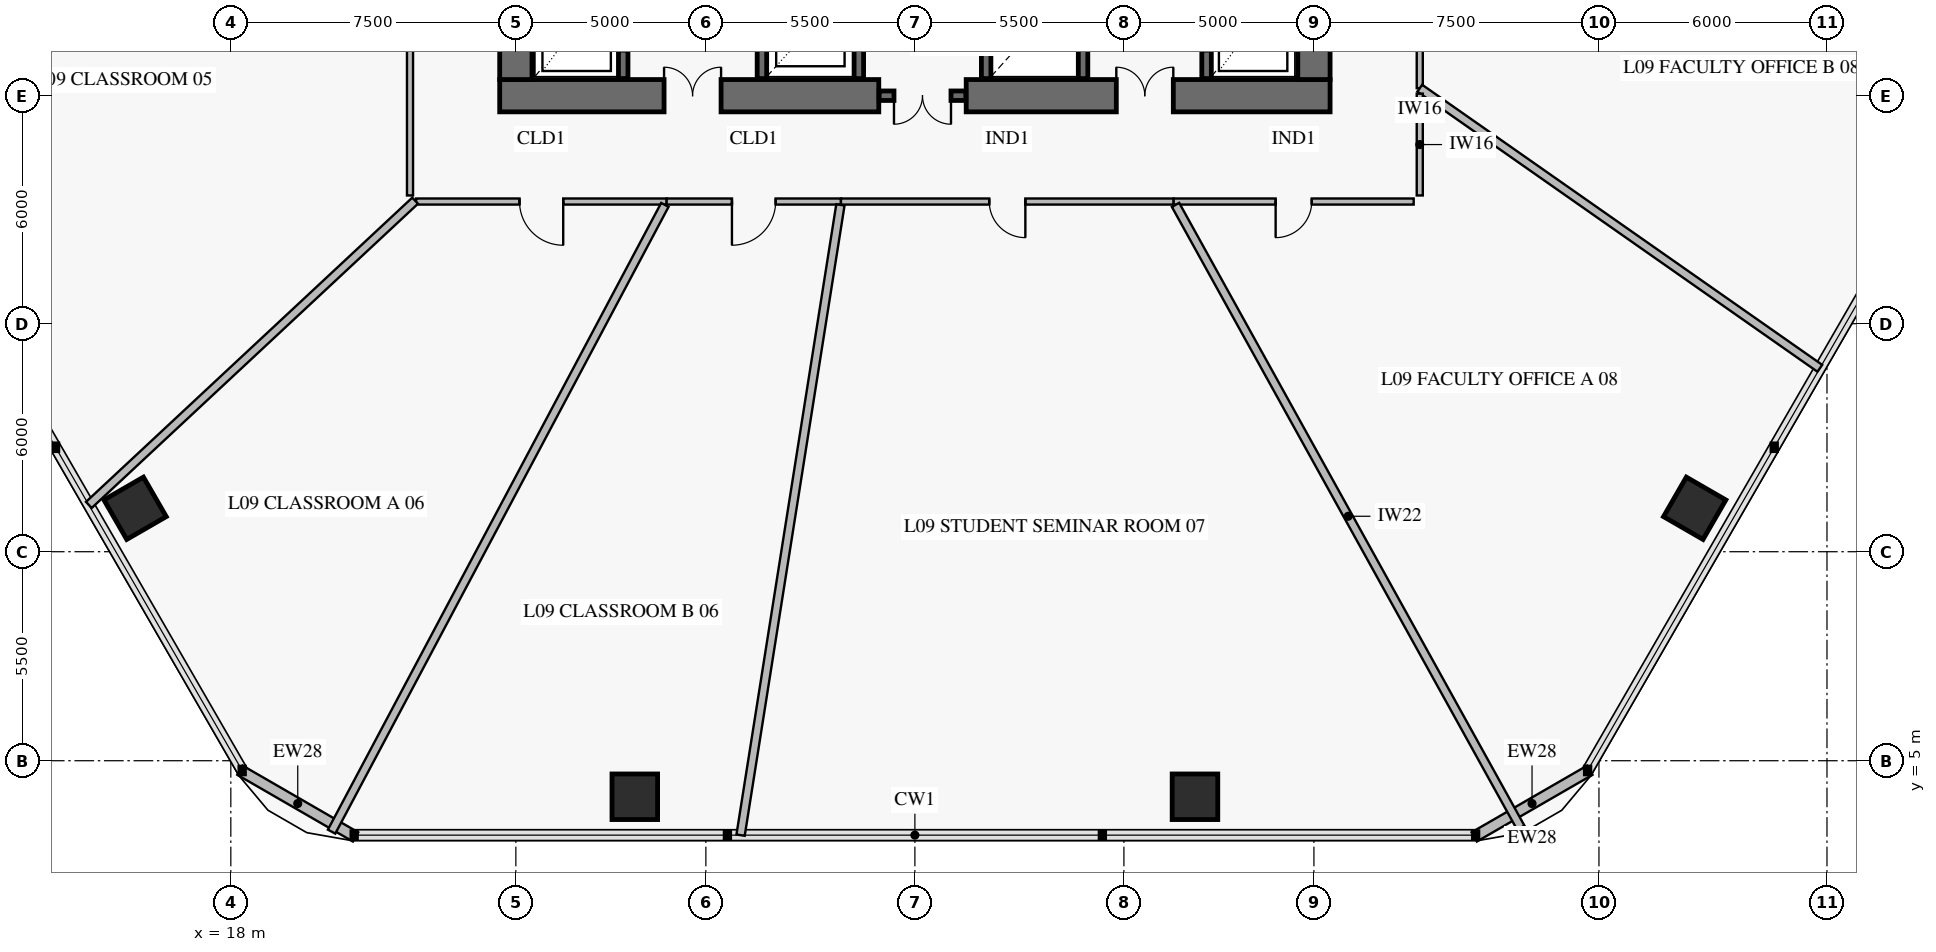
"""IFC4 building model, lengths in metres.
Left out: names, types, materials, properties, quantities, classifications, styles, units other than length and angle.
Written with IfcOpenShell. Run it as: python <this file> out.ifc"""

import sys

from ifc_helpers import new_model, si_unit, direction, frame, frame_2d, origin, origin_2d, place, context, subcontext, project, spatial, rectangle, extrude, element, fill, save


model = new_model("IFC4")
c1 = context("Model", 3, precision=1e-05, world=origin(), true_north=direction((0.0, 1.0)))
c2 = subcontext(c1, "Body", "Model", "MODEL_VIEW")
j1 = project(units=[si_unit("LENGTHUNIT", "METRE"), si_unit("PLANEANGLEUNIT", "RADIAN")], contexts=[c1])
p1 = place(None, origin())
s1 = spatial("IfcSite", under=j1, at=p1, CompositionType="ELEMENT")
p2 = place(p1, origin())
s2 = spatial("IfcBuilding", under=s1, at=p2, CompositionType="ELEMENT")
p3 = place(p2, frame((0.0, 0.0, 37.2)))
s3 = spatial("IfcBuildingStorey", under=s2, at=p3, CompositionType="ELEMENT", Elevation=37.2)
p4 = place(p3, frame((25.075, 22.5, 0.0), z_axis=(0.0, 0.0, 1.0), x_axis=(1.0, 0.0, 0.0)))
e1 = element("IfcWall", 1, at=p4, inside=s3, PredefinedType="SHEAR", context=c2, shape_type="SweptSolid", body=[
    extrude(rectangle(XDim=9.975, YDim=0.85, at=frame_2d((4.988, 0.0))), origin(), (0.0, 0.0, 1.0), 4.2),
])
p5 = place(p4, frame((4.325, 0.0, 0.0)))
e2 = element("IfcOpeningElement", 2, at=p5, cuts=e1, PredefinedType="OPENING", context=c2, shape_type="SweptSolid", body=[
    extrude(rectangle(XDim=1.5, YDim=2.15, at=frame_2d((0.75, 1.075))), frame((0.0, 0.437, 0.0), z_axis=(0.0, -1.0, 0.0), x_axis=(1.0, 0.0, 0.0)), (0.0, 0.0, 1.0), 0.874),
])
p6 = place(p3, frame((37.35, 22.5, 0.0), z_axis=(0.0, 0.0, 1.0), x_axis=(1.0, 0.0, 0.0)))
e3 = element("IfcWall", 3, at=p6, inside=s3, PredefinedType="SHEAR", context=c2, shape_type="SweptSolid", body=[
    extrude(rectangle(XDim=9.575, YDim=0.85, at=frame_2d((4.788, 0.0))), origin(), (0.0, 0.0, 1.0), 4.2),
])
p7 = place(p6, frame((3.95, 0.0, 0.0)))
e4 = element("IfcOpeningElement", 4, at=p7, cuts=e3, PredefinedType="OPENING", context=c2, shape_type="SweptSolid", body=[
    extrude(rectangle(XDim=1.5, YDim=2.15, at=frame_2d((0.75, 1.075))), frame((0.0, 0.437, 0.0), z_axis=(0.0, -1.0, 0.0), x_axis=(1.0, 0.0, 0.0)), (0.0, 0.0, 1.0), 0.874),
])
p8 = place(p3, frame((25.5, 22.925, 0.0), z_axis=(0.0, 0.0, 1.0), x_axis=(0.0, 1.0, 0.0)))
e5 = element("IfcWall", 5, at=p8, inside=s3, PredefinedType="SHEAR", context=c2, shape_type="SweptSolid", body=[
    extrude(rectangle(XDim=18.15, YDim=0.85, at=frame_2d((9.075, 0.0))), origin(), (0.0, 0.0, 1.0), 4.2),
])
p9 = place(p8, frame((8.825, 0.0, 0.0)))
e6 = element("IfcOpeningElement", 6, at=p9, cuts=e5, PredefinedType="OPENING", context=c2, shape_type="SweptSolid", body=[
    extrude(rectangle(XDim=1.1, YDim=2.15, at=frame_2d((0.55, 1.075))), frame((0.0, 0.437, 0.0), z_axis=(0.0, -1.0, 0.0), x_axis=(1.0, 0.0, 0.0)), (0.0, 0.0, 1.0), 0.874),
])
p10 = place(p3, frame((46.5, 22.925, 0.0), z_axis=(0.0, 0.0, 1.0), x_axis=(0.0, 1.0, 0.0)))
e7 = element("IfcWall", 7, at=p10, inside=s3, PredefinedType="SHEAR", context=c2, shape_type="SweptSolid", body=[
    extrude(rectangle(XDim=18.15, YDim=0.85, at=frame_2d((9.075, 0.0))), origin(), (0.0, 0.0, 1.0), 4.2),
])
p11 = place(p10, frame((8.825, 0.0, 0.0)))
e8 = element("IfcOpeningElement", 8, at=p11, cuts=e7, PredefinedType="OPENING", context=c2, shape_type="SweptSolid", body=[
    extrude(rectangle(XDim=1.1, YDim=2.15, at=frame_2d((0.55, 1.075))), frame((0.0, 0.437, 0.0), z_axis=(0.0, -1.0, 0.0), x_axis=(1.0, 0.0, 0.0)), (0.0, 0.0, 1.0), 0.874),
])
for number, where, z_axis, x_axis in (
    (9, (15.481, 11.643, 0.0), (0.0, 0.0, 1.0), (0.5, -0.866, 0.0)),
    (10, (28.63, 4.052, 0.0), (0.0, 0.0, 1.0), (1.0, 0.0, 0.0)),
    (11, (43.37, 4.052, 0.0), (0.0, 0.0, 1.0), (1.0, 0.0, 0.0)),
    (12, (56.519, 11.643, 0.0), (0.0, 0.0, 1.0), (0.5, 0.866, 0.0)),
):
    element("IfcColumn", number, at=place(p3, frame(where, z_axis=z_axis, x_axis=x_axis)), inside=s3, PredefinedType="COLUMN", context=c2, shape_type="SweptSolid", body=[
        extrude(rectangle(XDim=1.2, YDim=1.2, at=origin_2d()), origin(), (0.0, 0.0, 1.0), 3.92),
    ])
for number, where, z_axis, x_axis in (
    (13, (53.761, 4.751, 0.0), (0.0, 0.0, 1.0), (-0.866, -0.5, 0.0)),
    (14, (21.283, 2.994, 0.0), (0.0, 0.0, 1.0), (-0.866, 0.5, 0.0)),
):
    element("IfcWall", number, at=place(p3, frame(where, z_axis=z_axis, x_axis=x_axis)), inside=s3, PredefinedType="SOLIDWALL", context=c2, shape_type="SweptSolid", body=[
        extrude(rectangle(XDim=3.515, YDim=0.28, at=frame_2d((1.757, 0.0))), origin(), (0.0, 0.0, 1.0), 3.92),
    ])
p12 = place(p3, frame((35.06, 22.5, 0.0), z_axis=(0.0, 0.0, 1.0), x_axis=(1.0, 0.0, 0.0)))
e15 = element("IfcWall", 15, at=p12, inside=s3, PredefinedType="SOLIDWALL", context=c2, shape_type="SweptSolid", body=[
    extrude(rectangle(XDim=2.28, YDim=0.25, at=frame_2d((1.14, 0.0))), origin(), (0.0, 0.0, 1.0), 4.2),
])
p13 = place(p12, frame((0.39, 0.0, 0.0)))
e16 = element("IfcOpeningElement", 16, at=p13, cuts=e15, PredefinedType="OPENING", context=c2, shape_type="SweptSolid", body=[
    extrude(rectangle(XDim=1.5, YDim=2.15, at=frame_2d((0.75, 1.075))), frame((0.0, 0.137, 0.0), z_axis=(0.0, -1.0, 0.0), x_axis=(1.0, 0.0, 0.0)), (0.0, 0.0, 1.0), 0.274),
])
p14 = place(p3, frame((28.325, 22.95, 0.0), z_axis=(0.0, 0.0, 1.0), x_axis=(0.0, 1.0, 0.0)))
e17 = element("IfcWall", 17, at=p14, inside=s3, PredefinedType="SOLIDWALL", context=c2, shape_type="SweptSolid", body=[
    extrude(rectangle(XDim=8.2, YDim=0.25, at=frame_2d((4.1, 0.0))), origin(), (0.0, 0.0, 1.0), 4.2),
])
p15 = place(p14, frame((0.75, 0.0, 0.0)))
e18 = element("IfcOpeningElement", 18, at=p15, cuts=e17, PredefinedType="OPENING", context=c2, shape_type="SweptSolid", body=[
    extrude(rectangle(XDim=1.3, YDim=2.3, at=frame_2d((0.65, 1.15))), frame((0.0, 0.137, 0.0), z_axis=(0.0, -1.0, 0.0), x_axis=(1.0, 0.0, 0.0)), (0.0, 0.0, 1.0), 0.274),
])
p16 = place(p14, frame((3.78, 0.0, 0.0)))
e19 = element("IfcOpeningElement", 19, at=p16, cuts=e17, PredefinedType="OPENING", context=c2, shape_type="SweptSolid", body=[
    extrude(rectangle(XDim=0.9, YDim=2.1, at=frame_2d((0.45, 1.05))), frame((0.0, 0.137, 0.0), z_axis=(0.0, -1.0, 0.0), x_axis=(1.0, 0.0, 0.0)), (0.0, 0.0, 1.0), 0.274),
])
p17 = place(p14, frame((6.5, 0.0, 0.0)))
e20 = element("IfcOpeningElement", 20, at=p17, cuts=e17, PredefinedType="OPENING", context=c2, shape_type="SweptSolid", body=[
    extrude(rectangle(XDim=0.9, YDim=2.1, at=frame_2d((0.45, 1.05))), frame((0.0, 0.137, 0.0), z_axis=(0.0, -1.0, 0.0), x_axis=(1.0, 0.0, 0.0)), (0.0, 0.0, 1.0), 0.274),
])
p18 = place(p3, frame((31.975, 22.95, 0.0), z_axis=(0.0, 0.0, 1.0), x_axis=(0.0, 1.0, 0.0)))
e21 = element("IfcWall", 21, at=p18, inside=s3, PredefinedType="SOLIDWALL", context=c2, shape_type="SweptSolid", body=[
    extrude(rectangle(XDim=8.2, YDim=0.25, at=frame_2d((4.1, 0.0))), origin(), (0.0, 0.0, 1.0), 4.2),
])
p19 = place(p3, frame((34.525, 22.95, 0.0), z_axis=(0.0, 0.0, 1.0), x_axis=(0.0, 1.0, 0.0)))
e22 = element("IfcWall", 22, at=p19, inside=s3, PredefinedType="SOLIDWALL", context=c2, shape_type="SweptSolid", body=[
    extrude(rectangle(XDim=8.2, YDim=0.25, at=frame_2d((4.1, 0.0))), origin(), (0.0, 0.0, 1.0), 4.2),
])
p20 = place(p19, frame((0.775, 0.0, 0.0)))
e23 = element("IfcOpeningElement", 23, at=p20, cuts=e22, PredefinedType="OPENING", context=c2, shape_type="SweptSolid", body=[
    extrude(rectangle(XDim=1.1, YDim=2.2, at=frame_2d((0.55, 1.1))), frame((0.0, 0.137, 0.0), z_axis=(0.0, -1.0, 0.0), x_axis=(1.0, 0.0, 0.0)), (0.0, 0.0, 1.0), 0.274),
])
p21 = place(p19, frame((3.575, 0.0, 0.0)))
e24 = element("IfcOpeningElement", 24, at=p21, cuts=e22, PredefinedType="OPENING", context=c2, shape_type="SweptSolid", body=[
    extrude(rectangle(XDim=1.1, YDim=2.2, at=frame_2d((0.55, 1.1))), frame((0.0, 0.137, 0.0), z_axis=(0.0, -1.0, 0.0), x_axis=(1.0, 0.0, 0.0)), (0.0, 0.0, 1.0), 0.274),
])
p22 = place(p19, frame((6.375, 0.0, 0.0)))
e25 = element("IfcOpeningElement", 25, at=p22, cuts=e22, PredefinedType="OPENING", context=c2, shape_type="SweptSolid", body=[
    extrude(rectangle(XDim=1.1, YDim=2.2, at=frame_2d((0.55, 1.1))), frame((0.0, 0.137, 0.0), z_axis=(0.0, -1.0, 0.0), x_axis=(1.0, 0.0, 0.0)), (0.0, 0.0, 1.0), 0.274),
])
for number, where, z_axis, x_axis in (
    (26, (37.875, 22.95, 0.0), (0.0, 0.0, 1.0), (0.0, 1.0, 0.0)),
    (27, (40.425, 22.95, 0.0), (0.0, 0.0, 1.0), (0.0, 1.0, 0.0)),
):
    element("IfcWall", number, at=place(p3, frame(where, z_axis=z_axis, x_axis=x_axis)), inside=s3, PredefinedType="SOLIDWALL", context=c2, shape_type="SweptSolid", body=[
        extrude(rectangle(XDim=8.2, YDim=0.25, at=frame_2d((4.1, 0.0))), origin(), (0.0, 0.0, 1.0), 4.2),
    ])
p23 = place(p3, frame((43.675, 22.95, 0.0), z_axis=(0.0, 0.0, 1.0), x_axis=(0.0, 1.0, 0.0)))
e28 = element("IfcWall", 28, at=p23, inside=s3, PredefinedType="SOLIDWALL", context=c2, shape_type="SweptSolid", body=[
    extrude(rectangle(XDim=8.2, YDim=0.25, at=frame_2d((4.1, 0.0))), origin(), (0.0, 0.0, 1.0), 4.2),
])
p24 = place(p23, frame((0.75, 0.0, 0.0)))
e29 = element("IfcOpeningElement", 29, at=p24, cuts=e28, PredefinedType="OPENING", context=c2, shape_type="SweptSolid", body=[
    extrude(rectangle(XDim=1.3, YDim=2.3, at=frame_2d((0.65, 1.15))), frame((0.0, 0.137, 0.0), z_axis=(0.0, -1.0, 0.0), x_axis=(1.0, 0.0, 0.0)), (0.0, 0.0, 1.0), 0.274),
])
p25 = place(p23, frame((3.7, 0.0, 0.0)))
e30 = element("IfcOpeningElement", 30, at=p25, cuts=e28, PredefinedType="OPENING", context=c2, shape_type="SweptSolid", body=[
    extrude(rectangle(XDim=1.3, YDim=2.3, at=frame_2d((0.65, 1.15))), frame((0.0, 0.137, 0.0), z_axis=(0.0, -1.0, 0.0), x_axis=(1.0, 0.0, 0.0)), (0.0, 0.0, 1.0), 0.274),
])
p26 = place(p23, frame((6.62, 0.0, 0.0)))
e31 = element("IfcOpeningElement", 31, at=p26, cuts=e28, PredefinedType="OPENING", context=c2, shape_type="SweptSolid", body=[
    extrude(rectangle(XDim=0.9, YDim=2.1, at=frame_2d((0.45, 1.05))), frame((0.0, 0.137, 0.0), z_axis=(0.0, -1.0, 0.0), x_axis=(1.0, 0.0, 0.0)), (0.0, 0.0, 1.0), 0.274),
])
p27 = place(p3, frame((22.715, 31.304, 0.0), z_axis=(0.0, 0.0, 1.0), x_axis=(0.0, -1.0, 0.0)))
e32 = element("IfcWall", 32, at=p27, inside=s3, PredefinedType="PARTITIONING", context=c2, shape_type="SweptSolid", body=[
    extrude(rectangle(XDim=11.429, YDim=0.16, at=frame_2d((5.714, 0.0))), origin(), (0.0, 0.0, 1.0), 3.22),
])
p28 = place(p27, frame((5.139, 0.0, 0.0)))
e33 = element("IfcOpeningElement", 33, at=p28, cuts=e32, PredefinedType="OPENING", context=c2, shape_type="SweptSolid", body=[
    extrude(rectangle(XDim=1.15, YDim=2.2, at=frame_2d((0.575, 1.1))), frame((0.0, 0.092, 0.0), z_axis=(0.0, -1.0, 0.0), x_axis=(1.0, 0.0, 0.0)), (0.0, 0.0, 1.0), 0.184),
])
p29 = place(p3, frame((22.875, 19.715, 0.0), z_axis=(0.0, 0.0, 1.0), x_axis=(1.0, 0.0, 0.0)))
e34 = element("IfcWall", 34, at=p29, inside=s3, PredefinedType="PARTITIONING", context=c2, shape_type="SweptSolid", body=[
    extrude(rectangle(XDim=6.593, YDim=0.16, at=frame_2d((3.296, 0.0))), origin(), (0.0, 0.0, 1.0), 3.22),
])
p30 = place(p29, frame((2.721, 0.0, 0.0)))
e35 = element("IfcOpeningElement", 35, at=p30, cuts=e34, PredefinedType="OPENING", context=c2, shape_type="SweptSolid", body=[
    extrude(rectangle(XDim=1.15, YDim=2.2, at=frame_2d((0.575, 1.1))), frame((0.0, 0.092, 0.0), z_axis=(0.0, -1.0, 0.0), x_axis=(1.0, 0.0, 0.0)), (0.0, 0.0, 1.0), 0.184),
])
p31 = place(p3, frame((29.468, 19.715, 0.0), z_axis=(0.0, 0.0, 1.0), x_axis=(1.0, 0.0, 0.0)))
e36 = element("IfcWall", 36, at=p31, inside=s3, PredefinedType="PARTITIONING", context=c2, shape_type="SweptSolid", body=[
    extrude(rectangle(XDim=4.586, YDim=0.16, at=frame_2d((2.293, 0.0))), origin(), (0.0, 0.0, 1.0), 3.22),
])
p32 = place(p31, frame((1.718, 0.0, 0.0)))
e37 = element("IfcOpeningElement", 37, at=p32, cuts=e36, PredefinedType="OPENING", context=c2, shape_type="SweptSolid", body=[
    extrude(rectangle(XDim=1.15, YDim=2.2, at=frame_2d((0.575, 1.1))), frame((0.0, 0.092, 0.0), z_axis=(0.0, -1.0, 0.0), x_axis=(1.0, 0.0, 0.0)), (0.0, 0.0, 1.0), 0.184),
])
p33 = place(p3, frame((34.054, 19.715, 0.0), z_axis=(0.0, 0.0, 1.0), x_axis=(1.0, 0.0, 0.0)))
e38 = element("IfcWall", 38, at=p33, inside=s3, PredefinedType="PARTITIONING", context=c2, shape_type="SweptSolid", body=[
    extrude(rectangle(XDim=8.756, YDim=0.16, at=frame_2d((4.378, 0.0))), origin(), (0.0, 0.0, 1.0), 3.22),
])
p34 = place(p33, frame((3.903, 0.0, 0.0)))
e39 = element("IfcOpeningElement", 39, at=p34, cuts=e38, PredefinedType="OPENING", context=c2, shape_type="SweptSolid", body=[
    extrude(rectangle(XDim=0.95, YDim=2.1, at=frame_2d((0.475, 1.05))), frame((0.0, 0.092, 0.0), z_axis=(0.0, -1.0, 0.0), x_axis=(1.0, 0.0, 0.0)), (0.0, 0.0, 1.0), 0.184),
])
p35 = place(p3, frame((42.81, 19.715, 0.0), z_axis=(0.0, 0.0, 1.0), x_axis=(1.0, 0.0, 0.0)))
e40 = element("IfcWall", 40, at=p35, inside=s3, PredefinedType="PARTITIONING", context=c2, shape_type="SweptSolid", body=[
    extrude(rectangle(XDim=6.315, YDim=0.16, at=frame_2d((3.158, 0.0))), origin(), (0.0, 0.0, 1.0), 3.22),
])
p36 = place(p35, frame((2.683, 0.0, 0.0)))
e41 = element("IfcOpeningElement", 41, at=p36, cuts=e40, PredefinedType="OPENING", context=c2, shape_type="SweptSolid", body=[
    extrude(rectangle(XDim=0.95, YDim=2.1, at=frame_2d((0.475, 1.05))), frame((0.0, 0.092, 0.0), z_axis=(0.0, -1.0, 0.0), x_axis=(1.0, 0.0, 0.0)), (0.0, 0.0, 1.0), 0.184),
])
p37 = place(p3, frame((49.285, 22.698, 0.0), z_axis=(0.0, 0.0, 1.0), x_axis=(0.0, 1.0, 0.0)))
e42 = element("IfcWall", 42, at=p37, inside=s3, PredefinedType="PARTITIONING", context=c2, shape_type="SweptSolid", body=[
    extrude(rectangle(XDim=7.198, YDim=0.16, at=frame_2d((3.599, 0.0))), origin(), (0.0, 0.0, 1.0), 3.22),
])
p38 = place(p37, frame((3.124, 0.0, 0.0)))
e43 = element("IfcOpeningElement", 43, at=p38, cuts=e42, PredefinedType="OPENING", context=c2, shape_type="SweptSolid", body=[
    extrude(rectangle(XDim=0.95, YDim=2.1, at=frame_2d((0.475, 1.05))), frame((0.0, 0.092, 0.0), z_axis=(0.0, -1.0, 0.0), x_axis=(1.0, 0.0, 0.0)), (0.0, 0.0, 1.0), 0.184),
])
p39 = place(p3, frame((22.85, 19.737, 0.0), z_axis=(0.0, 0.0, 1.0), x_axis=(-0.731360864489, -0.681990678744, 0.0)))
e44 = element("IfcWall", 44, at=p39, inside=s3, PredefinedType="PARTITIONING", context=c2, shape_type="SweptSolid", body=[
    extrude(rectangle(XDim=11.74, YDim=0.22, at=frame_2d((5.87, 0.0))), origin(), (0.0, 0.0, 1.0), 3.17),
])
p40 = place(p3, frame((29.421, 19.627, 0.0), z_axis=(0.0, 0.0, 1.0), x_axis=(-0.469469908408, -0.882948472505, 0.0)))
e45 = element("IfcWall", 45, at=p40, inside=s3, PredefinedType="PARTITIONING", context=c2, shape_type="SweptSolid", body=[
    extrude(rectangle(XDim=18.68, YDim=0.22, at=frame_2d((9.34, 0.0))), origin(), (0.0, 0.0, 1.0), 3.17),
])
p41 = place(p3, frame((34.04, 19.627, 0.0), z_axis=(0.0, 0.0, 1.0), x_axis=(-0.156438882107, -0.98768764099, 0.0)))
e46 = element("IfcWall", 46, at=p41, inside=s3, PredefinedType="PARTITIONING", context=c2, shape_type="SweptSolid", body=[
    extrude(rectangle(XDim=16.792, YDim=0.22, at=frame_2d((8.396, 0.0))), origin(), (0.0, 0.0, 1.0), 3.17),
])
p42 = place(p3, frame((42.858, 19.627, 0.0), z_axis=(0.0, 0.0, 1.0), x_axis=(0.484814111505, -0.874617217579, 0.0)))
e47 = element("IfcWall", 47, at=p42, inside=s3, PredefinedType="PARTITIONING", context=c2, shape_type="SweptSolid", body=[
    extrude(rectangle(XDim=18.738, YDim=0.22, at=frame_2d((9.369, 0.0))), origin(), (0.0, 0.0, 1.0), 3.17),
])
p43 = place(p3, frame((49.285, 22.698, 0.0), z_axis=(0.0, 0.0, 1.0), x_axis=(0.819154265409, -0.57357326425, 0.0)))
e48 = element("IfcWall", 48, at=p43, inside=s3, PredefinedType="PARTITIONING", context=c2, shape_type="SweptSolid", body=[
    extrude(rectangle(XDim=12.851, YDim=0.22, at=frame_2d((6.426, 0.0))), origin(), (0.0, 0.0, 1.0), 3.17),
])
p44 = place(p3, frame((49.285, 19.875, 0.0), z_axis=(0.0, 0.0, 1.0), x_axis=(0.0, 1.0, 0.0)))
e49 = element("IfcWall", 49, at=p44, inside=s3, PredefinedType="PARTITIONING", context=c2, shape_type="SweptSolid", body=[
    extrude(rectangle(XDim=2.679, YDim=0.16, at=frame_2d((1.339, 0.0))), origin(), (0.0, 0.0, 1.0), 3.92),
])
p45 = place(p5, origin())
e50 = element("IfcDoor", 50, at=p45, inside=s3, OperationType="DOUBLE_DOOR_SINGLE_SWING", PredefinedType="DOOR", context=c2, shape_type="SweptSolid", body=[
    extrude(rectangle(XDim=1.5, YDim=2.15, at=frame_2d((0.75, 1.075))), frame((0.0, 0.025, 0.0), z_axis=(0.0, -1.0, 0.0), x_axis=(1.0, 0.0, 0.0)), (0.0, 0.0, 1.0), 0.05),
])
fill(e2, e50)
p46 = place(p7, origin())
e51 = element("IfcDoor", 51, at=p46, inside=s3, OperationType="DOUBLE_DOOR_SINGLE_SWING", PredefinedType="DOOR", context=c2, shape_type="SweptSolid", body=[
    extrude(rectangle(XDim=1.5, YDim=2.15, at=frame_2d((0.75, 1.075))), frame((0.0, 0.025, 0.0), z_axis=(0.0, -1.0, 0.0), x_axis=(1.0, 0.0, 0.0)), (0.0, 0.0, 1.0), 0.05),
])
fill(e4, e51)
p47 = place(p13, frame((1.5, 0.0, 0.0), z_axis=(0.0, 0.0, 1.0), x_axis=(-1.0, 0.0, 0.0)))
e52 = element("IfcDoor", 52, at=p47, inside=s3, OperationType="DOUBLE_DOOR_SINGLE_SWING", PredefinedType="DOOR", context=c2, shape_type="SweptSolid", body=[
    extrude(rectangle(XDim=1.5, YDim=2.15, at=frame_2d((0.75, 1.075))), frame((0.0, 0.025, 0.0), z_axis=(0.0, -1.0, 0.0), x_axis=(1.0, 0.0, 0.0)), (0.0, 0.0, 1.0), 0.05),
])
fill(e16, e52)
p48 = place(p30, frame((1.15, 0.0, 0.0), z_axis=(0.0, 0.0, 1.0), x_axis=(-1.0, 0.0, 0.0)))
e53 = element("IfcDoor", 53, at=p48, inside=s3, OperationType="SINGLE_SWING_LEFT", PredefinedType="DOOR", context=c2, shape_type="SweptSolid", body=[
    extrude(rectangle(XDim=1.15, YDim=2.2, at=frame_2d((0.575, 1.1))), frame((0.0, 0.025, 0.0), z_axis=(0.0, -1.0, 0.0), x_axis=(1.0, 0.0, 0.0)), (0.0, 0.0, 1.0), 0.05),
])
fill(e35, e53)
p49 = place(p32, frame((1.15, 0.0, 0.0), z_axis=(0.0, 0.0, 1.0), x_axis=(-1.0, 0.0, 0.0)))
e54 = element("IfcDoor", 54, at=p49, inside=s3, OperationType="SINGLE_SWING_RIGHT", PredefinedType="DOOR", context=c2, shape_type="SweptSolid", body=[
    extrude(rectangle(XDim=1.15, YDim=2.2, at=frame_2d((0.575, 1.1))), frame((0.0, 0.025, 0.0), z_axis=(0.0, -1.0, 0.0), x_axis=(1.0, 0.0, 0.0)), (0.0, 0.0, 1.0), 0.05),
])
fill(e37, e54)
p50 = place(p34, frame((0.95, 0.0, 0.0), z_axis=(0.0, 0.0, 1.0), x_axis=(-1.0, 0.0, 0.0)))
e55 = element("IfcDoor", 55, at=p50, inside=s3, OperationType="SINGLE_SWING_LEFT", PredefinedType="DOOR", context=c2, shape_type="SweptSolid", body=[
    extrude(rectangle(XDim=0.95, YDim=2.1, at=frame_2d((0.475, 1.05))), frame((0.0, 0.025, 0.0), z_axis=(0.0, -1.0, 0.0), x_axis=(1.0, 0.0, 0.0)), (0.0, 0.0, 1.0), 0.05),
])
fill(e39, e55)
p51 = place(p36, frame((0.95, 0.0, 0.0), z_axis=(0.0, 0.0, 1.0), x_axis=(-1.0, 0.0, 0.0)))
e56 = element("IfcDoor", 56, at=p51, inside=s3, OperationType="SINGLE_SWING_RIGHT", PredefinedType="DOOR", context=c2, shape_type="SweptSolid", body=[
    extrude(rectangle(XDim=0.95, YDim=2.1, at=frame_2d((0.475, 1.05))), frame((0.0, 0.025, 0.0), z_axis=(0.0, -1.0, 0.0), x_axis=(1.0, 0.0, 0.0)), (0.0, 0.0, 1.0), 0.05),
])
fill(e41, e56)
save(model, sys.argv[1])
